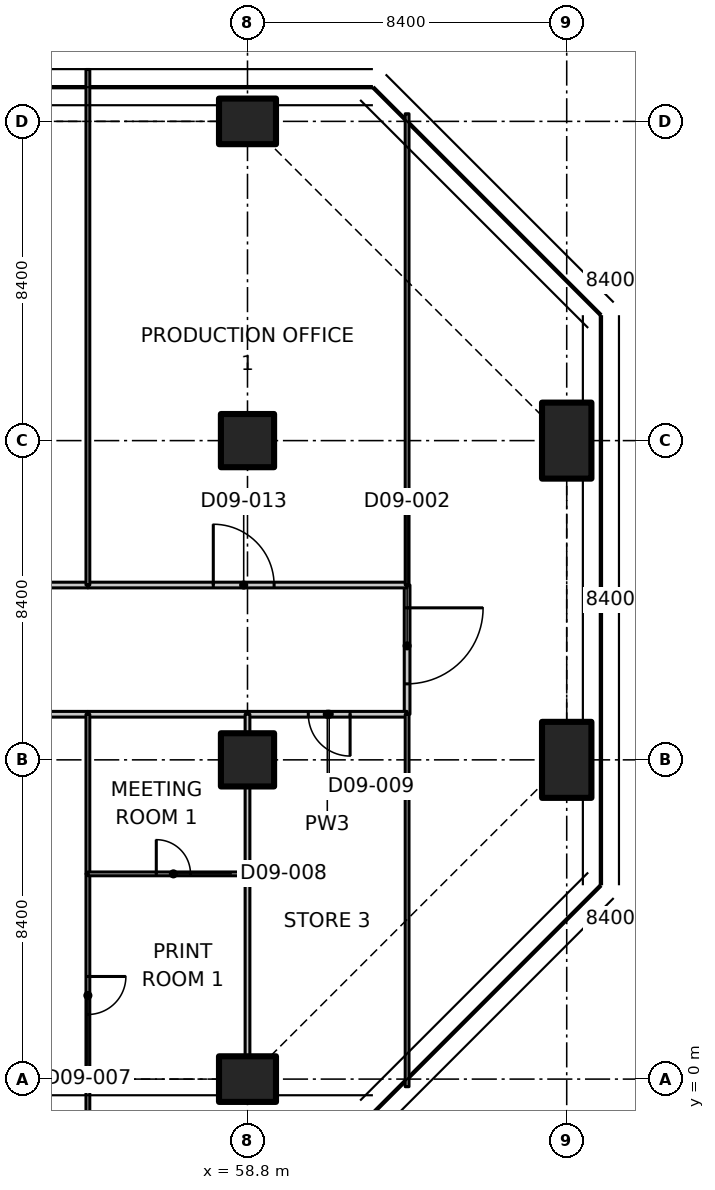
"""IFC4 building model, lengths in metres.
Left out: names, types, materials, properties, quantities, classifications, styles, units other than length and angle.
Written with IfcOpenShell. Run it as: python <this file> out.ifc"""

import sys

from ifc_helpers import new_model, si_unit, direction, frame, frame_2d, origin, origin_2d, place, context, subcontext, project, spatial, polyline, rectangle, outline, extrude, element, fill, save


model = new_model("IFC4")
c1 = context("Model", 3, precision=1e-05, world=origin(), true_north=direction((0.0, 1.0)))
c2 = subcontext(c1, "Body", "Model", "MODEL_VIEW")
j1 = project(units=[si_unit("LENGTHUNIT", "METRE"), si_unit("PLANEANGLEUNIT", "RADIAN")], contexts=[c1])
p1 = place(None, origin())
s1 = spatial("IfcSite", under=j1, at=p1, CompositionType="ELEMENT")
p2 = place(p1, origin())
s2 = spatial("IfcBuilding", under=s1, at=p2, CompositionType="ELEMENT")
p3 = place(p2, frame((0.0, 0.0, 61.7)))
s3 = spatial("IfcBuildingStorey", under=s2, at=p3, CompositionType="ELEMENT", Elevation=61.7)
p4 = place(p3, frame((58.8, 0.0, 0.0), z_axis=(0.0, 0.0, 1.0), x_axis=(0.0, 1.0, 0.0)))
e1 = element("IfcColumn", 1, at=p4, inside=s3, PredefinedType="COLUMN", context=c2, shape_type="SweptSolid", body=[
    extrude(rectangle(XDim=1.2, YDim=1.5, at=origin_2d()), origin(), (0.0, 0.0, 1.0), 3.35),
])
for number, where, z_axis, x_axis in (
    (2, (58.8, 8.4, 0.0), (0.0, 0.0, 1.0), (1.0, 0.0, 0.0)),
    (3, (58.8, 16.8, 0.0), (0.0, 0.0, 1.0), (1.0, 0.0, 0.0)),
):
    element("IfcColumn", number, at=place(p3, frame(where, z_axis=z_axis, x_axis=x_axis)), inside=s3, PredefinedType="COLUMN", context=c2, shape_type="SweptSolid", body=[
        extrude(rectangle(XDim=1.4, YDim=1.4, at=origin_2d()), origin(), (0.0, 0.0, 1.0), 3.35),
    ])
p5 = place(p3, frame((58.8, 25.2, 0.0), z_axis=(0.0, 0.0, 1.0), x_axis=(0.0, 1.0, 0.0)))
e4 = element("IfcColumn", 4, at=p5, inside=s3, PredefinedType="COLUMN", context=c2, shape_type="SweptSolid", body=[
    extrude(rectangle(XDim=1.2, YDim=1.5, at=origin_2d()), origin(), (0.0, 0.0, 1.0), 3.35),
])
for number, where, z_axis, x_axis in (
    (5, (67.2, 8.4, 0.0), (0.0, 0.0, 1.0), (1.0, 0.0, 0.0)),
    (6, (67.2, 16.8, 0.0), (0.0, 0.0, 1.0), (1.0, 0.0, 0.0)),
):
    element("IfcColumn", number, at=place(p3, frame(where, z_axis=z_axis, x_axis=x_axis)), inside=s3, PredefinedType="COLUMN", context=c2, shape_type="SweptSolid", body=[
        extrude(rectangle(XDim=1.3, YDim=2.0, at=origin_2d()), origin(), (0.0, 0.0, 1.0), 3.35),
    ])
p6 = place(p3, frame((63.0, 13.0, 0.0), z_axis=(0.0, 0.0, 1.0), x_axis=(0.0, -1.0, 0.0)))
e7 = element("IfcWall", 7, at=p6, inside=s3, PredefinedType="PARTITIONING", context=c2, shape_type="SweptSolid", body=[
    extrude(rectangle(XDim=3.4, YDim=0.15, at=frame_2d((1.7, 0.0))), origin(), (0.0, 0.0, 1.0), 3.33),
])
p7 = place(p6, frame((0.6, 0.0, 0.0)))
e8 = element("IfcOpeningElement", 8, at=p7, cuts=e7, PredefinedType="OPENING", context=c2, shape_type="SweptSolid", body=[
    extrude(rectangle(XDim=2.0, YDim=2.4, at=frame_2d((1.0, 1.2))), frame((0.0, 0.085, 0.0), z_axis=(0.0, -1.0, 0.0), x_axis=(1.0, 0.0, 0.0)), (0.0, 0.0, 1.0), 0.17),
])
p8 = place(p3, frame((54.6, 9.6, 0.0), z_axis=(0.0, 0.0, 1.0), x_axis=(-1.0, 0.0, 0.0)))
e9 = element("IfcWall", 9, at=p8, inside=s3, PredefinedType="PARTITIONING", context=c2, shape_type="SweptSolid", body=[
    extrude(rectangle(XDim=12.6, YDim=0.15, at=frame_2d((6.3, 0.0))), origin(), (0.0, 0.0, 1.0), 3.33),
])
p9 = place(p8, frame((5.4, 0.0, 0.0)))
e10 = element("IfcOpeningElement", 10, at=p9, cuts=e9, PredefinedType="OPENING", context=c2, shape_type="SweptSolid", body=[
    extrude(rectangle(XDim=1.8, YDim=2.1, at=frame_2d((0.9, 1.05))), frame((0.0, 0.085, 0.0), z_axis=(0.0, -1.0, 0.0), x_axis=(1.0, 0.0, 0.0)), (0.0, 0.0, 1.0), 0.17),
])
p10 = place(p3, frame((58.8, 9.6, 0.0), z_axis=(0.0, 0.0, 1.0), x_axis=(-1.0, 0.0, 0.0)))
e11 = element("IfcWall", 11, at=p10, inside=s3, PredefinedType="PARTITIONING", context=c2, shape_type="SweptSolid", body=[
    extrude(rectangle(XDim=4.2, YDim=0.15, at=frame_2d((2.1, 0.0))), origin(), (0.0, 0.0, 1.0), 3.33),
])
p11 = place(p3, frame((63.0, 9.6, 0.0), z_axis=(0.0, 0.0, 1.0), x_axis=(-1.0, 0.0, 0.0)))
e12 = element("IfcWall", 12, at=p11, inside=s3, PredefinedType="PARTITIONING", context=c2, shape_type="SweptSolid", body=[
    extrude(rectangle(XDim=4.2, YDim=0.15, at=frame_2d((2.1, 0.0))), origin(), (0.0, 0.0, 1.0), 3.33),
])
p12 = place(p11, frame((1.5, 0.0, 0.0)))
e13 = element("IfcOpeningElement", 13, at=p12, cuts=e12, PredefinedType="OPENING", context=c2, shape_type="SweptSolid", body=[
    extrude(rectangle(XDim=1.1, YDim=2.1, at=frame_2d((0.55, 1.05))), frame((0.0, 0.085, 0.0), z_axis=(0.0, -1.0, 0.0), x_axis=(1.0, 0.0, 0.0)), (0.0, 0.0, 1.0), 0.17),
])
p13 = place(p3, frame((49.4, 13.0, 0.0), z_axis=(0.0, 0.0, 1.0), x_axis=(1.0, 0.0, 0.0)))
e14 = element("IfcWall", 14, at=p13, inside=s3, PredefinedType="PARTITIONING", context=c2, shape_type="SweptSolid", body=[
    extrude(rectangle(XDim=5.2, YDim=0.15, at=frame_2d((2.6, 0.0))), origin(), (0.0, 0.0, 1.0), 3.33),
])
p14 = place(p3, frame((54.6, 13.0, 0.0), z_axis=(0.0, 0.0, 1.0), x_axis=(1.0, 0.0, 0.0)))
e15 = element("IfcWall", 15, at=p14, inside=s3, PredefinedType="PARTITIONING", context=c2, shape_type="SweptSolid", body=[
    extrude(rectangle(XDim=8.4, YDim=0.15, at=frame_2d((4.2, 0.0))), origin(), (0.0, 0.0, 1.0), 3.33),
])
p15 = place(p14, frame((3.3, 0.0, 0.0)))
e16 = element("IfcOpeningElement", 16, at=p15, cuts=e15, PredefinedType="OPENING", context=c2, shape_type="SweptSolid", body=[
    extrude(rectangle(XDim=1.6, YDim=2.1, at=frame_2d((0.8, 1.05))), frame((0.0, 0.085, 0.0), z_axis=(0.0, -1.0, 0.0), x_axis=(1.0, 0.0, 0.0)), (0.0, 0.0, 1.0), 0.17),
])
p16 = place(p3, frame((63.0, -0.2, 0.0), z_axis=(0.0, 0.0, 1.0), x_axis=(0.0, 1.0, 0.0)))
e17 = element("IfcWall", 17, at=p16, inside=s3, PredefinedType="PARTITIONING", context=c2, shape_type="SweptSolid", body=[
    extrude(outline(polyline([(0.0, 0.0), (9.8, 0.0), (9.8, 3.33), (5.066, 3.33), (5.064, 2.98), (3.736, 2.98), (3.734, 3.33), (0.0, 3.33), (0.0, 0.0)])), frame((0.0, 0.05, 0.0), z_axis=(0.0, -1.0, 0.0), x_axis=(1.0, 0.0, 0.0)), (0.0, 0.0, 1.0), 0.1),
])
p17 = place(p3, frame((63.0, 13.0, 0.0), z_axis=(0.0, 0.0, 1.0), x_axis=(0.0, 1.0, 0.0)))
e18 = element("IfcWall", 18, at=p17, inside=s3, PredefinedType="PARTITIONING", context=c2, shape_type="SweptSolid", body=[
    extrude(outline(polyline([(0.0, 0.0), (12.4, 0.0), (12.4, 3.33), (8.666, 3.33), (8.664, 2.98), (7.336, 2.98), (7.334, 3.33), (0.0, 3.33), (0.0, 0.0)])), frame((0.0, 0.05, 0.0), z_axis=(0.0, -1.0, 0.0), x_axis=(1.0, 0.0, 0.0)), (0.0, 0.0, 1.0), 0.1),
])
p18 = place(p3, frame((54.6, 5.4, 0.0), z_axis=(0.0, 0.0, 1.0), x_axis=(0.0, -1.0, 0.0)))
e19 = element("IfcWall", 19, at=p18, inside=s3, PredefinedType="PARTITIONING", context=c2, shape_type="SweptSolid", body=[
    extrude(outline(polyline([(0.0, 0.0), (6.574, 0.0), (6.574, 3.33), (6.5, 3.33), (5.85, 3.33), (5.848, 2.98), (4.952, 2.98), (4.95, 3.33), (0.0, 3.33), (0.0, 0.0)])), frame((0.0, 0.05, 0.0), z_axis=(0.0, -1.0, 0.0), x_axis=(1.0, 0.0, 0.0)), (0.0, 0.0, 1.0), 0.1),
])
p19 = place(p18, frame((2.7, 0.0, 0.0)))
e20 = element("IfcOpeningElement", 20, at=p19, cuts=e19, PredefinedType="OPENING", context=c2, shape_type="SweptSolid", body=[
    extrude(rectangle(XDim=1.0, YDim=2.1, at=frame_2d((0.5, 1.05))), frame((0.0, 0.06, 0.0), z_axis=(0.0, -1.0, 0.0), x_axis=(1.0, 0.0, 0.0)), (0.0, 0.0, 1.0), 0.12),
])
p20 = place(p3, frame((54.6, 9.6, 0.0), z_axis=(0.0, 0.0, 1.0), x_axis=(0.0, -1.0, 0.0)))
e21 = element("IfcWall", 21, at=p20, inside=s3, PredefinedType="PARTITIONING", context=c2, shape_type="SweptSolid", body=[
    extrude(rectangle(XDim=4.2, YDim=0.1, at=frame_2d((2.1, 0.0))), origin(), (0.0, 0.0, 1.0), 3.33),
])
p21 = place(p3, frame((54.6, 5.4, 0.0), z_axis=(0.0, 0.0, 1.0), x_axis=(1.0, 0.0, 0.0)))
e22 = element("IfcWall", 22, at=p21, inside=s3, PredefinedType="PARTITIONING", context=c2, shape_type="SweptSolid", body=[
    extrude(rectangle(XDim=4.2, YDim=0.1, at=frame_2d((2.1, 0.0))), origin(), (0.0, 0.0, 1.0), 3.33),
])
p22 = place(p21, frame((1.8, 0.0, 0.0)))
e23 = element("IfcOpeningElement", 23, at=p22, cuts=e22, PredefinedType="OPENING", context=c2, shape_type="SweptSolid", body=[
    extrude(rectangle(XDim=0.9, YDim=2.1, at=frame_2d((0.45, 1.05))), frame((0.0, 0.06, 0.0), z_axis=(0.0, -1.0, 0.0), x_axis=(1.0, 0.0, 0.0)), (0.0, 0.0, 1.0), 0.12),
])
p23 = place(p3, frame((58.8, 5.4, 0.0), z_axis=(0.0, 0.0, 1.0), x_axis=(0.0, -1.0, 0.0)))
e24 = element("IfcWall", 24, at=p23, inside=s3, PredefinedType="PARTITIONING", context=c2, shape_type="SweptSolid", body=[
    extrude(rectangle(XDim=4.78, YDim=0.125, at=frame_2d((2.39, 0.0))), origin(), (0.0, 0.0, 1.0), 3.33),
])
p24 = place(p3, frame((58.8, 9.6, 0.0), z_axis=(0.0, 0.0, 1.0), x_axis=(0.0, -1.0, 0.0)))
e25 = element("IfcWall", 25, at=p24, inside=s3, PredefinedType="PARTITIONING", context=c2, shape_type="SweptSolid", body=[
    extrude(rectangle(XDim=0.48, YDim=0.125, at=frame_2d((0.24, 0.0))), origin(), (0.0, 0.0, 1.0), 3.33),
])
p25 = place(p3, frame((58.8, 7.68, 0.0), z_axis=(0.0, 0.0, 1.0), x_axis=(0.0, -1.0, 0.0)))
e26 = element("IfcWall", 26, at=p25, inside=s3, PredefinedType="PARTITIONING", context=c2, shape_type="SweptSolid", body=[
    extrude(rectangle(XDim=2.28, YDim=0.125, at=frame_2d((1.14, 0.0))), origin(), (0.0, 0.0, 1.0), 3.33),
])
p26 = place(p3, frame((54.6, 26.565, 0.0), z_axis=(0.0, 0.0, 1.0), x_axis=(0.0, -1.0, 0.0)))
e27 = element("IfcWall", 27, at=p26, inside=s3, PredefinedType="PARTITIONING", context=c2, shape_type="SweptSolid", body=[
    extrude(outline(polyline([(0.0, 0.0), (13.565, 0.0), (13.565, 3.33), (1.815, 3.33), (1.813, 2.98), (0.917, 2.98), (0.915, 3.33), (0.265, 3.33), (0.0, 3.33), (0.0, 0.0)])), frame((0.0, 0.05, 0.0), z_axis=(0.0, -1.0, 0.0), x_axis=(1.0, 0.0, 0.0)), (0.0, 0.0, 1.0), 0.1),
])
p27 = place(p7, origin())
e28 = element("IfcDoor", 28, at=p27, inside=s3, OperationType="DOUBLE_DOOR_SINGLE_SWING", PredefinedType="DOOR", context=c2, shape_type="SweptSolid", body=[
    extrude(rectangle(XDim=2.0, YDim=2.4, at=frame_2d((1.0, 1.2))), frame((0.0, 0.025, 0.0), z_axis=(0.0, -1.0, 0.0), x_axis=(1.0, 0.0, 0.0)), (0.0, 0.0, 1.0), 0.05),
])
fill(e8, e28)
p28 = place(p19, origin())
e29 = element("IfcDoor", 29, at=p28, inside=s3, OperationType="SINGLE_SWING_LEFT", PredefinedType="DOOR", context=c2, shape_type="SweptSolid", body=[
    extrude(rectangle(XDim=1.0, YDim=2.1, at=frame_2d((0.5, 1.05))), frame((0.0, 0.025, 0.0), z_axis=(0.0, -1.0, 0.0), x_axis=(1.0, 0.0, 0.0)), (0.0, 0.0, 1.0), 0.05),
])
fill(e20, e29)
p29 = place(p22, origin())
e30 = element("IfcDoor", 30, at=p29, inside=s3, OperationType="SINGLE_SWING_LEFT", PredefinedType="DOOR", context=c2, shape_type="SweptSolid", body=[
    extrude(rectangle(XDim=0.9, YDim=2.1, at=frame_2d((0.45, 1.05))), frame((0.0, 0.025, 0.0), z_axis=(0.0, -1.0, 0.0), x_axis=(1.0, 0.0, 0.0)), (0.0, 0.0, 1.0), 0.05),
])
fill(e23, e30)
p30 = place(p12, origin())
e31 = element("IfcDoor", 31, at=p30, inside=s3, OperationType="SINGLE_SWING_LEFT", PredefinedType="DOOR", context=c2, shape_type="SweptSolid", body=[
    extrude(rectangle(XDim=1.1, YDim=2.1, at=frame_2d((0.55, 1.05))), frame((0.0, 0.025, 0.0), z_axis=(0.0, -1.0, 0.0), x_axis=(1.0, 0.0, 0.0)), (0.0, 0.0, 1.0), 0.05),
])
fill(e13, e31)
p31 = place(p15, origin())
e32 = element("IfcDoor", 32, at=p31, inside=s3, OperationType="DOUBLE_DOOR_SINGLE_SWING", PredefinedType="DOOR", context=c2, shape_type="SweptSolid", body=[
    extrude(rectangle(XDim=1.6, YDim=2.1, at=frame_2d((0.8, 1.05))), frame((0.0, 0.025, 0.0), z_axis=(0.0, -1.0, 0.0), x_axis=(1.0, 0.0, 0.0)), (0.0, 0.0, 1.0), 0.05),
])
fill(e16, e32)
save(model, sys.argv[1])
